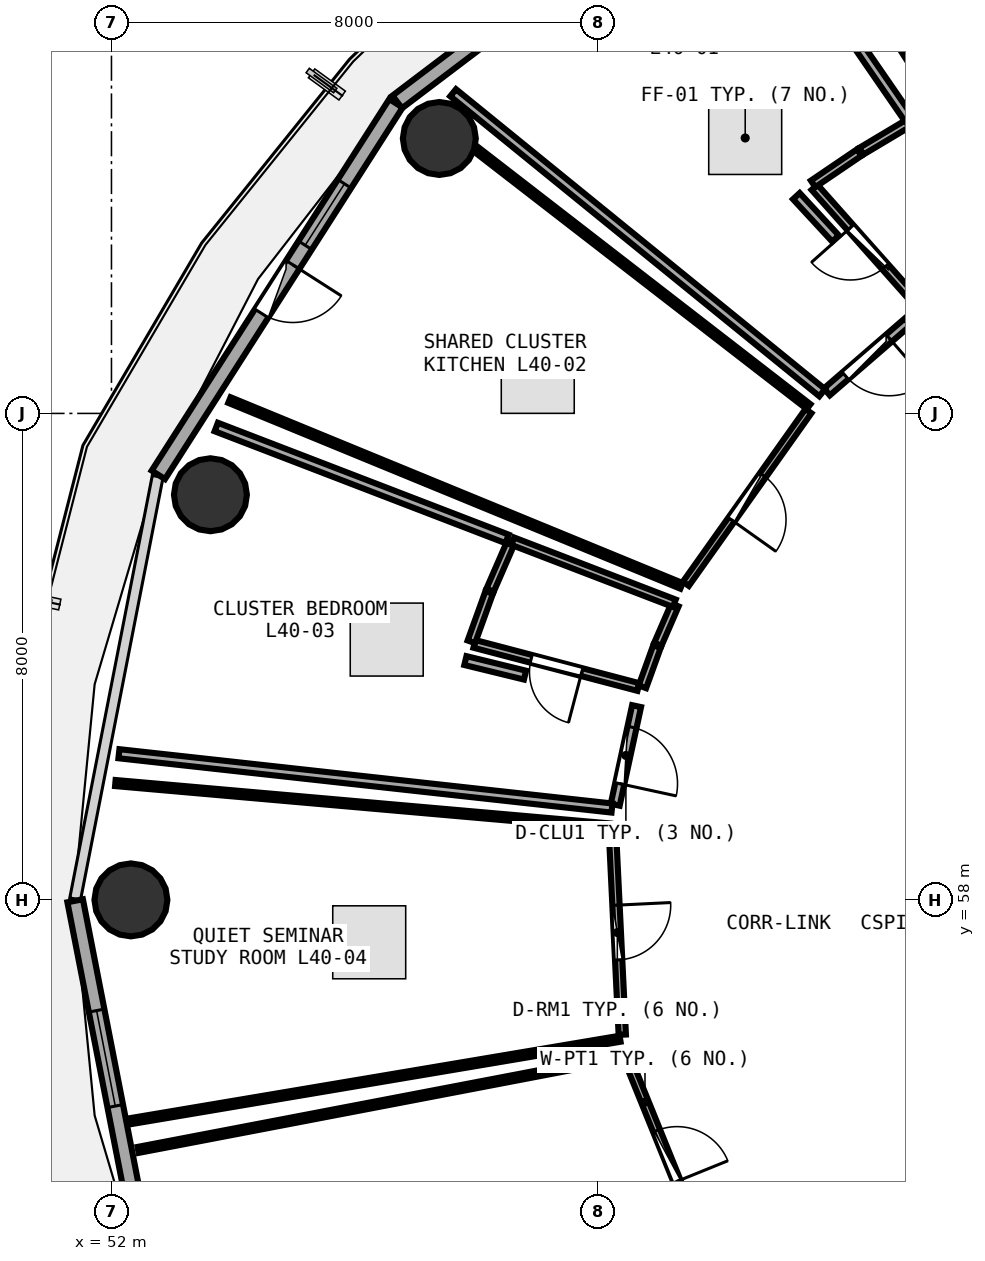
"""IFC4 building model, lengths in metres.
Left out: names, types, materials, properties, quantities, classifications, styles, units other than length and angle.
Written with IfcOpenShell. Run it as: python <this file> out.ifc"""

import sys

from ifc_helpers import new_model, si_unit, direction, frame, frame_2d, origin, origin_2d, place, context, subcontext, project, spatial, rectangle, circle, extrude, element, fill, save


model = new_model("IFC4")
c1 = context("Model", 3, precision=1e-05, world=origin(), true_north=direction((0.0, 1.0)))
c2 = subcontext(c1, "Body", "Model", "MODEL_VIEW")
j1 = project(units=[si_unit("LENGTHUNIT", "METRE"), si_unit("PLANEANGLEUNIT", "RADIAN")], contexts=[c1])
p1 = place(None, origin())
s1 = spatial("IfcSite", under=j1, at=p1, CompositionType="ELEMENT")
p2 = place(p1, origin())
s2 = spatial("IfcBuilding", under=s1, at=p2, CompositionType="ELEMENT")
p3 = place(p2, frame((0.0, 0.0, 158.1)))
s3 = spatial("IfcBuildingStorey", under=s2, at=p3, CompositionType="ELEMENT", Elevation=158.1)
for number, where, z_axis, x_axis in (
    (1, (57.392, 70.521, 0.0), (0.0, 0.0, 1.0), (1.0, 0.0, 0.0)),
    (2, (53.627, 64.663, 0.0), (0.0, 0.0, 1.0), (1.0, 0.0, 0.0)),
    (3, (52.32, 58.0, 0.0), (0.0, 0.0, 1.0), (1.0, 0.0, 0.0)),
):
    element("IfcColumn", number, at=place(p3, frame(where, z_axis=z_axis, x_axis=x_axis)), inside=s3, PredefinedType="COLUMN", context=c2, shape_type="SweptSolid", body=[
        extrude(circle(Radius=0.6, at=origin_2d()), origin(), (0.0, 0.0, 1.0), 3.75),
    ])
p4 = place(p3, frame((62.688, 75.658, 0.0), z_axis=(0.0, 0.0, 1.0), x_axis=(-0.797163719609, -0.603763202042, 0.0)))
e4 = element("IfcWall", 4, at=p4, inside=s3, PredefinedType="SOLIDWALL", context=c2, shape_type="SweptSolid", body=[
    extrude(rectangle(XDim=7.512, YDim=0.26, at=frame_2d((3.756, 0.0))), origin(), (0.0, 0.0, 1.0), 3.475),
])
p5 = place(p4, frame((2.956, 0.0, 0.85)))
e5 = element("IfcOpeningElement", 5, at=p5, cuts=e4, PredefinedType="OPENING", context=c2, shape_type="SweptSolid", body=[
    extrude(rectangle(XDim=1.6, YDim=1.45, at=frame_2d((0.8, 0.725))), frame((0.0, 0.14, 0.0), z_axis=(0.0, -1.0, 0.0), x_axis=(1.0, 0.0, 0.0)), (0.0, 0.0, 1.0), 0.28),
])
p6 = place(p3, frame((56.679, 71.1, 0.0), z_axis=(0.0, 0.0, 1.0), x_axis=(-0.538801521808, -0.842432739213, 0.0)))
e6 = element("IfcWall", 6, at=p6, inside=s3, PredefinedType="SOLIDWALL", context=c2, shape_type="SweptSolid", body=[
    extrude(rectangle(XDim=7.253, YDim=0.26, at=frame_2d((3.627, 0.0))), origin(), (0.0, 0.0, 1.0), 3.475),
])
p7 = place(p6, frame((3.152, 0.0, 0.0)))
e7 = element("IfcOpeningElement", 7, at=p7, cuts=e6, PredefinedType="OPENING", context=c2, shape_type="SweptSolid", body=[
    extrude(rectangle(XDim=0.95, YDim=2.1, at=frame_2d((0.475, 1.05))), frame((0.0, 0.14, 0.0), z_axis=(0.0, -1.0, 0.0), x_axis=(1.0, 0.0, 0.0)), (0.0, 0.0, 1.0), 0.28),
])
p8 = place(p6, frame((1.572, 0.0, 0.85)))
e8 = element("IfcOpeningElement", 8, at=p8, cuts=e6, PredefinedType="OPENING", context=c2, shape_type="SweptSolid", body=[
    extrude(rectangle(XDim=1.2, YDim=1.45, at=frame_2d((0.6, 0.725))), frame((0.0, 0.14, 0.0), z_axis=(0.0, -1.0, 0.0), x_axis=(1.0, 0.0, 0.0)), (0.0, 0.0, 1.0), 0.28),
])
p9 = place(p3, frame((51.403, 57.985, 0.0), z_axis=(0.0, 0.0, 1.0), x_axis=(0.191716984769, -0.981450252306, 0.0)))
e9 = element("IfcWall", 9, at=p9, inside=s3, PredefinedType="SOLIDWALL", context=c2, shape_type="SweptSolid", body=[
    extrude(rectangle(XDim=7.079, YDim=0.26, at=frame_2d((3.54, 0.0))), origin(), (0.0, 0.0, 1.0), 3.475),
])
p10 = place(p9, frame((1.84, 0.0, 0.85)))
e10 = element("IfcOpeningElement", 10, at=p10, cuts=e9, PredefinedType="OPENING", context=c2, shape_type="SweptSolid", body=[
    extrude(rectangle(XDim=1.6, YDim=1.45, at=frame_2d((0.8, 0.725))), frame((0.0, 0.14, 0.0), z_axis=(0.0, -1.0, 0.0), x_axis=(1.0, 0.0, 0.0)), (0.0, 0.0, 1.0), 0.28),
])
p11 = place(p3, frame((65.315, 67.747, 0.0), z_axis=(0.0, 0.0, 1.0), x_axis=(-0.664185753234, 0.74756757902, 0.0)))
e11 = element("IfcWall", 11, at=p11, inside=s3, PredefinedType="PLUMBINGWALL", context=c2, shape_type="SweptSolid", body=[
    extrude(rectangle(XDim=2.638, YDim=0.13, at=frame_2d((1.319, 0.0))), origin(), (0.0, 0.0, 1.0), 2.975),
])
p12 = place(p11, frame((0.889, 0.0, 0.0)))
e12 = element("IfcOpeningElement", 12, at=p12, cuts=e11, PredefinedType="OPENING", context=c2, shape_type="SweptSolid", body=[
    extrude(rectangle(XDim=0.86, YDim=2.05, at=frame_2d((0.43, 1.025))), frame((0.0, 0.075, 0.0), z_axis=(0.0, -1.0, 0.0), x_axis=(1.0, 0.0, 0.0)), (0.0, 0.0, 1.0), 0.15),
])
p13 = place(p3, frame((65.094, 67.505, 0.0), z_axis=(0.0, 0.0, 1.0), x_axis=(-0.756110527693, -0.654443939472, 0.0)))
e13 = element("IfcWall", 13, at=p13, inside=s3, PredefinedType="PARTITIONING", context=c2, shape_type="SweptSolid", body=[
    extrude(rectangle(XDim=1.758, YDim=0.15, at=frame_2d((0.879, 0.0))), origin(), (0.0, 0.0, 1.0), 2.975),
])
p14 = place(p13, frame((0.404, 0.0, 0.0)))
e14 = element("IfcOpeningElement", 14, at=p14, cuts=e13, PredefinedType="OPENING", context=c2, shape_type="SweptSolid", body=[
    extrude(rectangle(XDim=0.95, YDim=2.08, at=frame_2d((0.475, 1.04))), frame((0.0, 0.085, 0.0), z_axis=(0.0, -1.0, 0.0), x_axis=(1.0, 0.0, 0.0)), (0.0, 0.0, 1.0), 0.17),
])
p15 = place(p3, frame((63.462, 66.038, 0.0), z_axis=(0.0, 0.0, 1.0), x_axis=(-0.578762045024, -0.815496471629, 0.0)))
e15 = element("IfcWall", 15, at=p15, inside=s3, PredefinedType="PARTITIONING", context=c2, shape_type="SweptSolid", body=[
    extrude(rectangle(XDim=3.483, YDim=0.12, at=frame_2d((1.741, 0.0))), origin(), (0.0, 0.0, 1.0), 2.975),
])
p16 = place(p15, frame((1.291, 0.0, 0.0)))
e16 = element("IfcOpeningElement", 16, at=p16, cuts=e15, PredefinedType="OPENING", context=c2, shape_type="SweptSolid", body=[
    extrude(rectangle(XDim=0.9, YDim=2.08, at=frame_2d((0.45, 1.04))), frame((0.0, 0.07, 0.0), z_axis=(0.0, -1.0, 0.0), x_axis=(1.0, 0.0, 0.0)), (0.0, 0.0, 1.0), 0.14),
])
p17 = place(p3, frame((60.667, 61.5, 0.0), z_axis=(0.0, 0.0, 1.0), x_axis=(-0.967098346806, 0.254402805813, 0.0)))
e17 = element("IfcWall", 17, at=p17, inside=s3, PredefinedType="PLUMBINGWALL", context=c2, shape_type="SweptSolid", body=[
    extrude(rectangle(XDim=2.789, YDim=0.13, at=frame_2d((1.395, 0.0))), origin(), (0.0, 0.0, 1.0), 3.175),
])
p18 = place(p17, frame((0.964, 0.0, 0.0)))
e18 = element("IfcOpeningElement", 18, at=p18, cuts=e17, PredefinedType="OPENING", context=c2, shape_type="SweptSolid", body=[
    extrude(rectangle(XDim=0.86, YDim=2.05, at=frame_2d((0.43, 1.025))), frame((0.0, 0.075, 0.0), z_axis=(0.0, -1.0, 0.0), x_axis=(1.0, 0.0, 0.0)), (0.0, 0.0, 1.0), 0.15),
])
p19 = place(p3, frame((60.636, 61.186, 0.0), z_axis=(0.0, 0.0, 1.0), x_axis=(-0.211879832264, -0.977295726318, 0.0)))
e19 = element("IfcWall", 19, at=p19, inside=s3, PredefinedType="PARTITIONING", context=c2, shape_type="SweptSolid", body=[
    extrude(rectangle(XDim=1.659, YDim=0.15, at=frame_2d((0.83, 0.0))), origin(), (0.0, 0.0, 1.0), 3.48),
])
p20 = place(p19, frame((0.355, 0.0, 0.0)))
e20 = element("IfcOpeningElement", 20, at=p20, cuts=e19, PredefinedType="OPENING", context=c2, shape_type="SweptSolid", body=[
    extrude(rectangle(XDim=0.95, YDim=2.08, at=frame_2d((0.475, 1.04))), frame((0.0, 0.085, 0.0), z_axis=(0.0, -1.0, 0.0), x_axis=(1.0, 0.0, 0.0)), (0.0, 0.0, 1.0), 0.17),
])
p21 = place(p3, frame((60.238, 59.144, 0.0), z_axis=(0.0, 0.0, 1.0), x_axis=(0.048537190422, -0.998821375996, 0.0)))
e21 = element("IfcWall", 21, at=p21, inside=s3, PredefinedType="PARTITIONING", context=c2, shape_type="SweptSolid", body=[
    extrude(rectangle(XDim=3.365, YDim=0.12, at=frame_2d((1.683, 0.0))), origin(), (0.0, 0.0, 1.0), 2.975),
])
p22 = place(p21, frame((1.233, 0.0, 0.0)))
e22 = element("IfcOpeningElement", 22, at=p22, cuts=e21, PredefinedType="OPENING", context=c2, shape_type="SweptSolid", body=[
    extrude(rectangle(XDim=0.9, YDim=2.08, at=frame_2d((0.45, 1.04))), frame((0.0, 0.07, 0.0), z_axis=(0.0, -1.0, 0.0), x_axis=(1.0, 0.0, 0.0)), (0.0, 0.0, 1.0), 0.14),
])
p23 = place(p3, frame((60.492, 55.369, 0.0), z_axis=(0.0, 0.0, 1.0), x_axis=(0.3756420079, -0.926764847143, 0.0)))
e23 = element("IfcWall", 23, at=p23, inside=s3, PredefinedType="PARTITIONING", context=c2, shape_type="SweptSolid", body=[
    extrude(rectangle(XDim=3.413, YDim=0.12, at=frame_2d((1.707, 0.0))), origin(), (0.0, 0.0, 1.0), 3.235),
])
p24 = place(p23, frame((1.256, 0.0, 0.0)))
e24 = element("IfcOpeningElement", 24, at=p24, cuts=e23, PredefinedType="OPENING", context=c2, shape_type="SweptSolid", body=[
    extrude(rectangle(XDim=0.9, YDim=2.08, at=frame_2d((0.45, 1.04))), frame((0.0, 0.07, 0.0), z_axis=(0.0, -1.0, 0.0), x_axis=(1.0, 0.0, 0.0)), (0.0, 0.0, 1.0), 0.14),
])
p25 = place(p3, frame((67.063, 68.799, 0.0), z_axis=(0.0, 0.0, 1.0), x_axis=(-0.538644897025, 0.842532892479, 0.0)))
e25 = element("IfcWall", 25, at=p25, inside=s3, PredefinedType="PARTITIONING", context=c2, shape_type="SweptSolid", body=[
    extrude(rectangle(XDim=6.594, YDim=0.1, at=frame_2d((3.297, 0.0))), origin(), (0.0, 0.0, 1.0), 3.175),
])
p26 = place(p3, frame((63.54, 69.775, 0.0), z_axis=(0.0, 0.0, 1.0), x_axis=(0.827440475962, 0.561553433558, 0.0)))
e26 = element("IfcWall", 26, at=p26, inside=s3, PredefinedType="PLUMBINGWALL", context=c2, shape_type="SweptSolid", body=[
    extrude(rectangle(XDim=0.918, YDim=0.13, at=frame_2d((0.459, 0.0))), origin(), (0.0, 0.0, 1.0), 2.975),
])
p27 = place(p3, frame((64.333, 70.312, 0.0), z_axis=(0.0, 0.0, 1.0), x_axis=(0.858494754448, 0.512822344077, 0.0)))
e27 = element("IfcWall", 27, at=p27, inside=s3, PredefinedType="PLUMBINGWALL", context=c2, shape_type="SweptSolid", body=[
    extrude(rectangle(XDim=0.923, YDim=0.13, at=frame_2d((0.461, 0.0))), origin(), (0.0, 0.0, 1.0), 2.975),
])
p28 = place(p3, frame((63.689, 66.34, 0.0), z_axis=(0.0, 0.0, 1.0), x_axis=(-0.77600992695, 0.630720693553, 0.0)))
e28 = element("IfcWall", 28, at=p28, inside=s3, PredefinedType="PARTITIONING", context=c2, shape_type="SweptSolid", body=[
    extrude(rectangle(XDim=7.822, YDim=0.15, at=frame_2d((3.911, 0.0))), origin(), (0.0, 0.0, 1.0), 2.975),
])
p29 = place(p3, frame((62.355, 74.845, 0.0), z_axis=(0.0, 0.0, 1.0), x_axis=(0.56747106095, -0.823393341596, 0.0)))
e29 = element("IfcWall", 29, at=p29, inside=s3, PredefinedType="PARTITIONING", context=c2, shape_type="SweptSolid", body=[
    extrude(rectangle(XDim=4.837, YDim=0.15, at=frame_2d((2.418, 0.0))), origin(), (0.0, 0.0, 1.0), 2.975),
])
p30 = place(p3, frame((63.264, 69.573, 0.0), z_axis=(0.0, 0.0, 1.0), x_axis=(0.678771543933, -0.734349502041, 0.0)))
e30 = element("IfcWall", 30, at=p30, inside=s3, PredefinedType="PARTITIONING", context=c2, shape_type="SweptSolid", body=[
    extrude(rectangle(XDim=0.949, YDim=0.15, at=frame_2d((0.474, 0.0))), origin(), (0.0, 0.0, 1.0), 3.48),
])
p31 = place(p3, frame((61.375, 63.164, 0.0), z_axis=(0.0, 0.0, 1.0), x_axis=(-0.924943940784, 0.380103546953, 0.0)))
e31 = element("IfcWall", 31, at=p31, inside=s3, PredefinedType="PARTITIONING", context=c2, shape_type="SweptSolid", body=[
    extrude(rectangle(XDim=8.038, YDim=0.1, at=frame_2d((4.019, 0.0))), origin(), (0.0, 0.0, 1.0), 2.975),
])
p32 = place(p3, frame((57.992, 70.346, 0.0), z_axis=(0.0, 0.0, 1.0), x_axis=(0.790939607083, -0.611894221207, 0.0)))
e32 = element("IfcWall", 32, at=p32, inside=s3, PredefinedType="PARTITIONING", context=c2, shape_type="SweptSolid", body=[
    extrude(rectangle(XDim=6.92, YDim=0.1, at=frame_2d((3.46, 0.0))), origin(), (0.0, 0.0, 1.0), 2.975),
])
p33 = place(p3, frame((61.268, 62.853, 0.0), z_axis=(0.0, 0.0, 1.0), x_axis=(-0.398284741881, -0.917261829787, 0.0)))
e33 = element("IfcWall", 33, at=p33, inside=s3, PredefinedType="PLUMBINGWALL", context=c2, shape_type="SweptSolid", body=[
    extrude(rectangle(XDim=0.708, YDim=0.13, at=frame_2d((0.354, 0.0))), origin(), (0.0, 0.0, 1.0), 3.235),
])
p34 = place(p3, frame((60.971, 62.166, 0.0), z_axis=(0.0, 0.0, 1.0), x_axis=(-0.340044773791, -0.940409246987, 0.0)))
e34 = element("IfcWall", 34, at=p34, inside=s3, PredefinedType="PLUMBINGWALL", context=c2, shape_type="SweptSolid", body=[
    extrude(rectangle(XDim=0.704, YDim=0.13, at=frame_2d((0.352, 0.0))), origin(), (0.0, 0.0, 1.0), 3.235),
])
p35 = place(p3, frame((57.919, 62.244, 0.0), z_axis=(0.0, 0.0, 1.0), x_axis=(0.339790338004, 0.9405012101, 0.0)))
e35 = element("IfcWall", 35, at=p35, inside=s3, PredefinedType="PLUMBINGWALL", context=c2, shape_type="SweptSolid", body=[
    extrude(rectangle(XDim=0.864, YDim=0.13, at=frame_2d((0.432, 0.0))), origin(), (0.0, 0.0, 1.0), 3.175),
])
p36 = place(p3, frame((58.227, 63.093, 0.0), z_axis=(0.0, 0.0, 1.0), x_axis=(0.39925148709, 0.916841453064, 0.0)))
e36 = element("IfcWall", 36, at=p36, inside=s3, PredefinedType="PLUMBINGWALL", context=c2, shape_type="SweptSolid", body=[
    extrude(rectangle(XDim=0.866, YDim=0.13, at=frame_2d((0.433, 0.0))), origin(), (0.0, 0.0, 1.0), 3.175),
])
p37 = place(p3, frame((58.6, 63.899, 0.0), z_axis=(0.0, 0.0, 1.0), x_axis=(0.933544382438, -0.358461833418, 0.0)))
e37 = element("IfcWall", 37, at=p37, inside=s3, PredefinedType="PLUMBINGWALL", context=c2, shape_type="SweptSolid", body=[
    extrude(rectangle(XDim=2.847, YDim=0.13, at=frame_2d((1.423, 0.0))), origin(), (0.0, 0.0, 1.0), 3.175),
])
p38 = place(p3, frame((60.232, 59.51, 0.0), z_axis=(0.0, 0.0, 1.0), x_axis=(-0.993990557846, 0.109465843587, 0.0)))
e38 = element("IfcWall", 38, at=p38, inside=s3, PredefinedType="PARTITIONING", context=c2, shape_type="SweptSolid", body=[
    extrude(rectangle(XDim=8.158, YDim=0.15, at=frame_2d((4.079, 0.0))), origin(), (0.0, 0.0, 1.0), 3.025),
])
p39 = place(p3, frame((53.723, 65.777, 0.0), z_axis=(0.0, 0.0, 1.0), x_axis=(0.933303856141, -0.359087610636, 0.0)))
e39 = element("IfcWall", 39, at=p39, inside=s3, PredefinedType="PARTITIONING", context=c2, shape_type="SweptSolid", body=[
    extrude(rectangle(XDim=5.125, YDim=0.15, at=frame_2d((2.562, 0.0))), origin(), (0.0, 0.0, 1.0), 2.975),
])
p40 = place(p3, frame((57.821, 61.936, 0.0), z_axis=(0.0, 0.0, 1.0), x_axis=(0.971451046406, -0.237240098712, 0.0)))
e40 = element("IfcWall", 40, at=p40, inside=s3, PredefinedType="PARTITIONING", context=c2, shape_type="SweptSolid", body=[
    extrude(rectangle(XDim=1.01, YDim=0.15, at=frame_2d((0.505, 0.0))), origin(), (0.0, 0.0, 1.0), 3.175),
])
p41 = place(p3, frame((60.365, 55.716, 0.0), z_axis=(0.0, 0.0, 1.0), x_axis=(-0.986127701838, -0.165988420279, 0.0)))
e41 = element("IfcWall", 41, at=p41, inside=s3, PredefinedType="PARTITIONING", context=c2, shape_type="SweptSolid", body=[
    extrude(rectangle(XDim=8.144, YDim=0.1, at=frame_2d((4.072, 0.0))), origin(), (0.0, 0.0, 1.0), 3.025),
])
p42 = place(p3, frame((52.064, 59.921, 0.0), z_axis=(0.0, 0.0, 1.0), x_axis=(0.996168646625, -0.087453001553, 0.0)))
e42 = element("IfcWall", 42, at=p42, inside=s3, PredefinedType="PARTITIONING", context=c2, shape_type="SweptSolid", body=[
    extrude(rectangle(XDim=8.163, YDim=0.1, at=frame_2d((4.082, 0.0))), origin(), (0.0, 0.0, 1.0), 3.025),
])
p43 = place(p3, frame((52.438, 53.888, 0.0), z_axis=(0.0, 0.0, 1.0), x_axis=(0.982187250003, 0.187904778897, 0.0)))
e43 = element("IfcWall", 43, at=p43, inside=s3, PredefinedType="PARTITIONING", context=c2, shape_type="SweptSolid", body=[
    extrude(rectangle(XDim=8.137, YDim=0.1, at=frame_2d((4.069, 0.0))), origin(), (0.0, 0.0, 1.0), 3.025),
])
p44 = place(p7, frame((0.95, 0.0, 0.0), z_axis=(0.0, 0.0, 1.0), x_axis=(-1.0, 0.0, 0.0)))
e44 = element("IfcDoor", 44, at=p44, inside=s3, OperationType="SINGLE_SWING_RIGHT", PredefinedType="DOOR", context=c2, shape_type="SweptSolid", body=[
    extrude(rectangle(XDim=0.95, YDim=2.1, at=frame_2d((0.475, 1.05))), frame((0.0, 0.025, 0.0), z_axis=(0.0, -1.0, 0.0), x_axis=(1.0, 0.0, 0.0)), (0.0, 0.0, 1.0), 0.05),
])
fill(e7, e44)
p45 = place(p8, origin())
e45 = element("IfcWindow", 45, at=p45, inside=s3, PartitioningType="SINGLE_PANEL", PredefinedType="WINDOW", context=c2, shape_type="SweptSolid", body=[
    extrude(rectangle(XDim=1.2, YDim=1.45, at=frame_2d((0.6, 0.725))), frame((0.0, 0.03, 0.0), z_axis=(0.0, -1.0, 0.0), x_axis=(1.0, 0.0, 0.0)), (0.0, 0.0, 1.0), 0.06),
])
fill(e8, e45)
p46 = place(p10, origin())
e46 = element("IfcWindow", 46, at=p46, inside=s3, PartitioningType="SINGLE_PANEL", PredefinedType="WINDOW", context=c2, shape_type="SweptSolid", body=[
    extrude(rectangle(XDim=1.6, YDim=1.45, at=frame_2d((0.8, 0.725))), frame((0.0, 0.03, 0.0), z_axis=(0.0, -1.0, 0.0), x_axis=(1.0, 0.0, 0.0)), (0.0, 0.0, 1.0), 0.06),
])
fill(e10, e46)
p47 = place(p12, origin())
e47 = element("IfcDoor", 47, at=p47, inside=s3, OperationType="SINGLE_SWING_RIGHT", PredefinedType="DOOR", context=c2, shape_type="SweptSolid", body=[
    extrude(rectangle(XDim=0.86, YDim=2.05, at=frame_2d((0.43, 1.025))), frame((0.0, 0.025, 0.0), z_axis=(0.0, -1.0, 0.0), x_axis=(1.0, 0.0, 0.0)), (0.0, 0.0, 1.0), 0.05),
])
fill(e12, e47)
p48 = place(p14, origin())
e48 = element("IfcDoor", 48, at=p48, inside=s3, OperationType="SINGLE_SWING_LEFT", PredefinedType="DOOR", context=c2, shape_type="SweptSolid", body=[
    extrude(rectangle(XDim=0.95, YDim=2.08, at=frame_2d((0.475, 1.04))), frame((0.0, 0.025, 0.0), z_axis=(0.0, -1.0, 0.0), x_axis=(1.0, 0.0, 0.0)), (0.0, 0.0, 1.0), 0.05),
])
fill(e14, e48)
p49 = place(p16, origin())
e49 = element("IfcDoor", 49, at=p49, inside=s3, OperationType="SINGLE_SWING_RIGHT", PredefinedType="DOOR", context=c2, shape_type="SweptSolid", body=[
    extrude(rectangle(XDim=0.9, YDim=2.08, at=frame_2d((0.45, 1.04))), frame((0.0, 0.025, 0.0), z_axis=(0.0, -1.0, 0.0), x_axis=(1.0, 0.0, 0.0)), (0.0, 0.0, 1.0), 0.05),
])
fill(e16, e49)
p50 = place(p18, origin())
e50 = element("IfcDoor", 50, at=p50, inside=s3, OperationType="SINGLE_SWING_LEFT", PredefinedType="DOOR", context=c2, shape_type="SweptSolid", body=[
    extrude(rectangle(XDim=0.86, YDim=2.05, at=frame_2d((0.43, 1.025))), frame((0.0, 0.025, 0.0), z_axis=(0.0, -1.0, 0.0), x_axis=(1.0, 0.0, 0.0)), (0.0, 0.0, 1.0), 0.05),
])
fill(e18, e50)
p51 = place(p20, origin())
e51 = element("IfcDoor", 51, at=p51, inside=s3, OperationType="SINGLE_SWING_RIGHT", PredefinedType="DOOR", context=c2, shape_type="SweptSolid", body=[
    extrude(rectangle(XDim=0.95, YDim=2.08, at=frame_2d((0.475, 1.04))), frame((0.0, 0.025, 0.0), z_axis=(0.0, -1.0, 0.0), x_axis=(1.0, 0.0, 0.0)), (0.0, 0.0, 1.0), 0.05),
])
fill(e20, e51)
p52 = place(p22, origin())
e52 = element("IfcDoor", 52, at=p52, inside=s3, OperationType="SINGLE_SWING_LEFT", PredefinedType="DOOR", context=c2, shape_type="SweptSolid", body=[
    extrude(rectangle(XDim=0.9, YDim=2.08, at=frame_2d((0.45, 1.04))), frame((0.0, 0.025, 0.0), z_axis=(0.0, -1.0, 0.0), x_axis=(1.0, 0.0, 0.0)), (0.0, 0.0, 1.0), 0.05),
])
fill(e22, e52)
p53 = place(p24, origin())
e53 = element("IfcDoor", 53, at=p53, inside=s3, OperationType="SINGLE_SWING_RIGHT", PredefinedType="DOOR", context=c2, shape_type="SweptSolid", body=[
    extrude(rectangle(XDim=0.9, YDim=2.08, at=frame_2d((0.45, 1.04))), frame((0.0, 0.025, 0.0), z_axis=(0.0, -1.0, 0.0), x_axis=(1.0, 0.0, 0.0)), (0.0, 0.0, 1.0), 0.05),
])
fill(e24, e53)
save(model, sys.argv[1])
